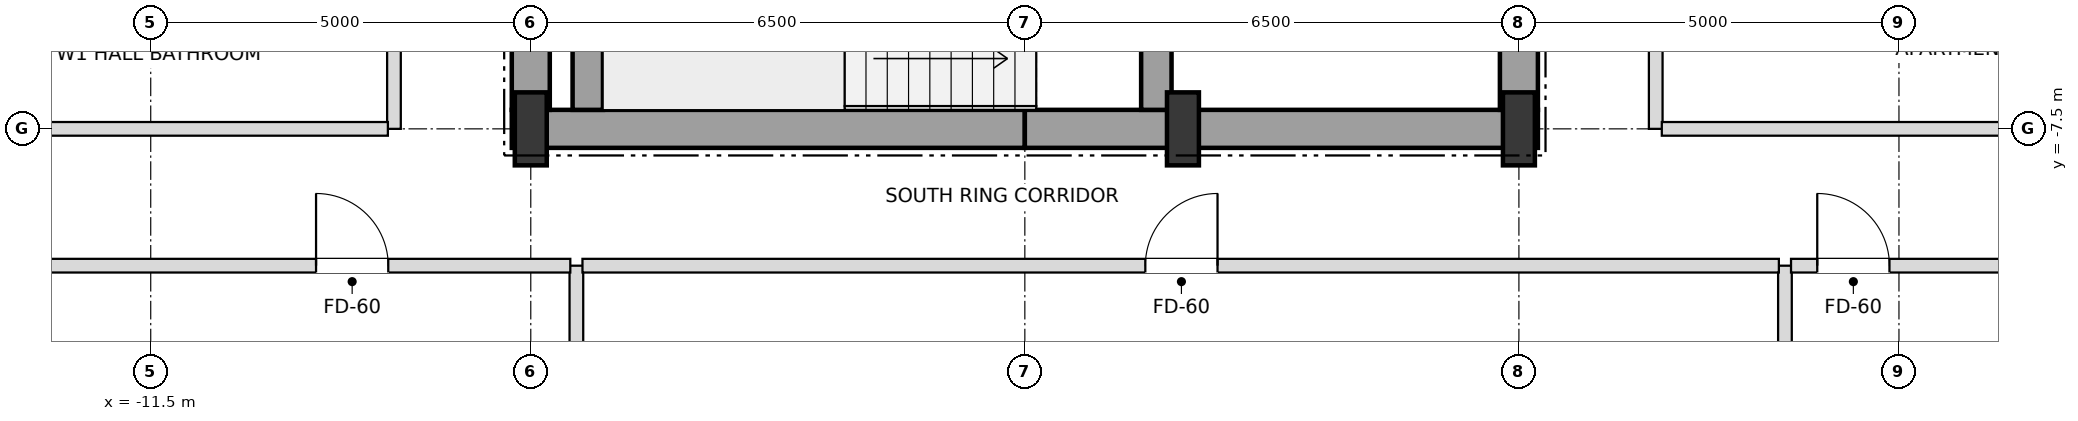
"""IFC4 building model, lengths in metres.
Left out: names, types, materials, properties, quantities, classifications, styles, units other than length and angle.
Written with IfcOpenShell. Run it as: python <this file> out.ifc"""

import sys

from ifc_helpers import new_model, si_unit, direction, frame, frame_2d, origin, origin_2d, place, context, subcontext, project, spatial, rectangle, i_section, extrude, element, fill, save


model = new_model("IFC4")
c1 = context("Model", 3, precision=1e-05, world=origin(), true_north=direction((0.0, 1.0)))
c2 = subcontext(c1, "Body", "Model", "MODEL_VIEW")
j1 = project(units=[si_unit("LENGTHUNIT", "METRE"), si_unit("PLANEANGLEUNIT", "RADIAN")], contexts=[c1])
p1 = place(None, origin())
s1 = spatial("IfcSite", under=j1, at=p1, CompositionType="ELEMENT")
p2 = place(p1, origin())
s2 = spatial("IfcBuilding", under=s1, at=p2, CompositionType="ELEMENT")
p3 = place(p2, frame((0.0, 0.0, 61.2)))
s3 = spatial("IfcBuildingStorey", under=s2, at=p3, CompositionType="ELEMENT", Elevation=61.2)
for number, where, z_axis, x_axis in (
    (1, (-6.5, -7.5, 0.0), (0.0, 0.0, 1.0), (1.0, 0.0, 0.0)),
    (2, (2.08, -7.5, 0.0), (0.0, 0.0, 1.0), (1.0, 0.0, 0.0)),
    (3, (6.5, -7.5, 0.0), (0.0, 0.0, 1.0), (1.0, 0.0, 0.0)),
):
    element("IfcColumn", number, at=place(p3, frame(where, z_axis=z_axis, x_axis=x_axis)), inside=s3, PredefinedType="COLUMN", context=c2, shape_type="SweptSolid", body=[
        extrude(i_section(OverallWidth=0.42, OverallDepth=0.96, WebThickness=0.022, FlangeThickness=0.034, at=origin_2d()), origin(), (0.0, 0.0, 1.0), 3.6),
    ])
for number, where, z_axis, x_axis in (
    (4, (-6.75, -7.5, 0.0), (0.0, 0.0, 1.0), (1.0, 0.0, 0.0)),
    (5, (0.0, -7.5, 0.0), (0.0, 0.0, 1.0), (1.0, 0.0, 0.0)),
):
    element("IfcWall", number, at=place(p3, frame(where, z_axis=z_axis, x_axis=x_axis)), inside=s3, PredefinedType="SHEAR", context=c2, shape_type="SweptSolid", body=[
        extrude(rectangle(XDim=6.75, YDim=0.5, at=frame_2d((3.375, 0.0))), origin(), (0.0, 0.0, 1.0), 3.38),
    ])
p4 = place(p3, frame((-6.5, -7.25, 0.0), z_axis=(0.0, 0.0, 1.0), x_axis=(0.0, 1.0, 0.0)))
e6 = element("IfcWall", 6, at=p4, inside=s3, PredefinedType="SHEAR", context=c2, shape_type="SweptSolid", body=[
    extrude(rectangle(XDim=3.55, YDim=0.5, at=frame_2d((1.775, 0.0))), origin(), (0.0, 0.0, 1.0), 3.38),
])
p5 = place(p3, frame((6.5, -7.25, 0.0), z_axis=(0.0, 0.0, 1.0), x_axis=(0.0, 1.0, 0.0)))
e7 = element("IfcWall", 7, at=p5, inside=s3, PredefinedType="SHEAR", context=c2, shape_type="SweptSolid", body=[
    extrude(rectangle(XDim=5.75, YDim=0.5, at=frame_2d((2.875, 0.0))), origin(), (0.0, 0.0, 1.0), 3.38),
])
p6 = place(p5, frame((0.85, 0.0, 0.0)))
e8 = element("IfcOpeningElement", 8, at=p6, cuts=e7, PredefinedType="OPENING", context=c2, shape_type="SweptSolid", body=[
    extrude(rectangle(XDim=1.05, YDim=2.15, at=frame_2d((0.525, 1.075))), frame((0.0, 0.26, 0.0), z_axis=(0.0, -1.0, 0.0), x_axis=(1.0, 0.0, 0.0)), (0.0, 0.0, 1.0), 0.52),
])
p7 = place(p3, frame((-5.75, -7.25, 0.0), z_axis=(0.0, 0.0, 1.0), x_axis=(0.0, 1.0, 0.0)))
e9 = element("IfcWall", 9, at=p7, inside=s3, PredefinedType="SHEAR", context=c2, shape_type="SweptSolid", body=[
    extrude(rectangle(XDim=2.9, YDim=0.4, at=frame_2d((1.45, 0.0))), origin(), (0.0, 0.0, 1.0), 3.38),
])
p8 = place(p3, frame((1.73, -7.25, 0.0), z_axis=(0.0, 0.0, 1.0), x_axis=(0.0, 1.0, 0.0)))
e10 = element("IfcWall", 10, at=p8, inside=s3, PredefinedType="SHEAR", context=c2, shape_type="SweptSolid", body=[
    extrude(rectangle(XDim=3.3, YDim=0.4, at=frame_2d((1.65, 0.0))), origin(), (0.0, 0.0, 1.0), 3.38),
])
p9 = place(p8, frame((0.9, 0.0, 0.0)))
e11 = element("IfcOpeningElement", 11, at=p9, cuts=e10, PredefinedType="OPENING", context=c2, shape_type="SweptSolid", body=[
    extrude(rectangle(XDim=1.05, YDim=2.15, at=frame_2d((0.525, 1.075))), frame((0.0, 0.21, 0.0), z_axis=(0.0, -1.0, 0.0), x_axis=(1.0, 0.0, 0.0)), (0.0, 0.0, 1.0), 0.42),
])
p10 = place(p3, frame((-8.3, -7.5, 0.0), z_axis=(0.0, 0.0, 1.0), x_axis=(0.0, 1.0, 0.0)))
e12 = element("IfcWall", 12, at=p10, inside=s3, PredefinedType="PARTITIONING", context=c2, shape_type="SweptSolid", body=[
    extrude(rectangle(XDim=15.0, YDim=0.18, at=frame_2d((7.5, 0.0))), origin(), (0.0, 0.0, 1.0), 3.38),
])
p11 = place(p10, frame((3.475, 0.0, 0.0)))
e13 = element("IfcOpeningElement", 13, at=p11, cuts=e12, PredefinedType="OPENING", context=c2, shape_type="SweptSolid", body=[
    extrude(rectangle(XDim=0.95, YDim=2.15, at=frame_2d((0.475, 1.075))), frame((0.0, 0.1, 0.0), z_axis=(0.0, -1.0, 0.0), x_axis=(1.0, 0.0, 0.0)), (0.0, 0.0, 1.0), 0.2),
])
p12 = place(p3, frame((-5.9, -24.9, 0.0), z_axis=(0.0, 0.0, 1.0), x_axis=(0.0, 1.0, 0.0)))
e14 = element("IfcWall", 14, at=p12, inside=s3, PredefinedType="PARTITIONING", context=c2, shape_type="SweptSolid", body=[
    extrude(rectangle(XDim=15.6, YDim=0.18, at=frame_2d((7.8, 0.0))), origin(), (0.0, 0.0, 1.0), 2.816),
])
p13 = place(p3, frame((8.3, -7.5, 0.0), z_axis=(0.0, 0.0, 1.0), x_axis=(0.0, 1.0, 0.0)))
e15 = element("IfcWall", 15, at=p13, inside=s3, PredefinedType="PARTITIONING", context=c2, shape_type="SweptSolid", body=[
    extrude(rectangle(XDim=15.0, YDim=0.18, at=frame_2d((7.5, 0.0))), origin(), (0.0, 0.0, 1.0), 3.38),
])
p14 = place(p13, frame((3.475, 0.0, 0.0)))
e16 = element("IfcOpeningElement", 16, at=p14, cuts=e15, PredefinedType="OPENING", context=c2, shape_type="SweptSolid", body=[
    extrude(rectangle(XDim=0.95, YDim=2.15, at=frame_2d((0.475, 1.075))), frame((0.0, 0.1, 0.0), z_axis=(0.0, -1.0, 0.0), x_axis=(1.0, 0.0, 0.0)), (0.0, 0.0, 1.0), 0.2),
])
p15 = place(p3, frame((10.0, -24.9, 0.0), z_axis=(0.0, 0.0, 1.0), x_axis=(0.0, 1.0, 0.0)))
e17 = element("IfcWall", 17, at=p15, inside=s3, PredefinedType="PARTITIONING", context=c2, shape_type="SweptSolid", body=[
    extrude(rectangle(XDim=15.6, YDim=0.18, at=frame_2d((7.8, 0.0))), origin(), (0.0, 0.0, 1.0), 2.816),
])
p16 = place(p3, frame((-18.4, -9.3, 0.0), z_axis=(0.0, 0.0, 1.0), x_axis=(1.0, 0.0, 0.0)))
e18 = element("IfcWall", 18, at=p16, inside=s3, PredefinedType="PARTITIONING", context=c2, shape_type="SweptSolid", body=[
    extrude(rectangle(XDim=12.42, YDim=0.18, at=frame_2d((6.21, 0.0))), origin(), (0.0, 0.0, 1.0), 2.816),
])
p17 = place(p16, frame((9.075, 0.0, 0.0)))
e19 = element("IfcOpeningElement", 19, at=p17, cuts=e18, PredefinedType="OPENING", context=c2, shape_type="SweptSolid", body=[
    extrude(rectangle(XDim=0.95, YDim=2.15, at=frame_2d((0.475, 1.075))), frame((0.0, 0.1, 0.0), z_axis=(0.0, -1.0, 0.0), x_axis=(1.0, 0.0, 0.0)), (0.0, 0.0, 1.0), 0.2),
])
p18 = place(p3, frame((-5.82, -9.3, 0.0), z_axis=(0.0, 0.0, 1.0), x_axis=(1.0, 0.0, 0.0)))
e20 = element("IfcWall", 20, at=p18, inside=s3, PredefinedType="PARTITIONING", context=c2, shape_type="SweptSolid", body=[
    extrude(rectangle(XDim=15.74, YDim=0.18, at=frame_2d((7.87, 0.0))), origin(), (0.0, 0.0, 1.0), 2.816),
])
p19 = place(p18, frame((7.405, 0.0, 0.0)))
e21 = element("IfcOpeningElement", 21, at=p19, cuts=e20, PredefinedType="OPENING", context=c2, shape_type="SweptSolid", body=[
    extrude(rectangle(XDim=0.95, YDim=2.15, at=frame_2d((0.475, 1.075))), frame((0.0, 0.1, 0.0), z_axis=(0.0, -1.0, 0.0), x_axis=(1.0, 0.0, 0.0)), (0.0, 0.0, 1.0), 0.2),
])
p20 = place(p3, frame((10.08, -9.3, 0.0), z_axis=(0.0, 0.0, 1.0), x_axis=(1.0, 0.0, 0.0)))
e22 = element("IfcWall", 22, at=p20, inside=s3, PredefinedType="PARTITIONING", context=c2, shape_type="SweptSolid", body=[
    extrude(rectangle(XDim=8.32, YDim=0.18, at=frame_2d((4.16, 0.0))), origin(), (0.0, 0.0, 1.0), 2.816),
])
p21 = place(p20, frame((0.345, 0.0, 0.0)))
e23 = element("IfcOpeningElement", 23, at=p21, cuts=e22, PredefinedType="OPENING", context=c2, shape_type="SweptSolid", body=[
    extrude(rectangle(XDim=0.95, YDim=2.15, at=frame_2d((0.475, 1.075))), frame((0.0, 0.1, 0.0), z_axis=(0.0, -1.0, 0.0), x_axis=(1.0, 0.0, 0.0)), (0.0, 0.0, 1.0), 0.2),
])
for number, where, z_axis, x_axis in (
    (24, (-16.02, -7.5, 0.0), (0.0, 0.0, 1.0), (1.0, 0.0, 0.0)),
    (25, (8.38, -7.5, 0.0), (0.0, 0.0, 1.0), (1.0, 0.0, 0.0)),
):
    element("IfcWall", number, at=place(p3, frame(where, z_axis=z_axis, x_axis=x_axis)), inside=s3, PredefinedType="PARTITIONING", context=c2, shape_type="SweptSolid", body=[
        extrude(rectangle(XDim=7.64, YDim=0.18, at=frame_2d((3.82, 0.0))), origin(), (0.0, 0.0, 1.0), 2.816),
    ])
p22 = place(p17, origin())
e26 = element("IfcDoor", 26, at=p22, inside=s3, OperationType="SINGLE_SWING_LEFT", PredefinedType="DOOR", context=c2, shape_type="SweptSolid", body=[
    extrude(rectangle(XDim=0.95, YDim=2.15, at=frame_2d((0.475, 1.075))), frame((0.0, 0.025, 0.0), z_axis=(0.0, -1.0, 0.0), x_axis=(1.0, 0.0, 0.0)), (0.0, 0.0, 1.0), 0.05),
])
fill(e19, e26)
p23 = place(p19, origin())
e27 = element("IfcDoor", 27, at=p23, inside=s3, OperationType="SINGLE_SWING_RIGHT", PredefinedType="DOOR", context=c2, shape_type="SweptSolid", body=[
    extrude(rectangle(XDim=0.95, YDim=2.15, at=frame_2d((0.475, 1.075))), frame((0.0, 0.025, 0.0), z_axis=(0.0, -1.0, 0.0), x_axis=(1.0, 0.0, 0.0)), (0.0, 0.0, 1.0), 0.05),
])
fill(e21, e27)
p24 = place(p21, origin())
e28 = element("IfcDoor", 28, at=p24, inside=s3, OperationType="SINGLE_SWING_LEFT", PredefinedType="DOOR", context=c2, shape_type="SweptSolid", body=[
    extrude(rectangle(XDim=0.95, YDim=2.15, at=frame_2d((0.475, 1.075))), frame((0.0, 0.025, 0.0), z_axis=(0.0, -1.0, 0.0), x_axis=(1.0, 0.0, 0.0)), (0.0, 0.0, 1.0), 0.05),
])
fill(e23, e28)
save(model, sys.argv[1])
